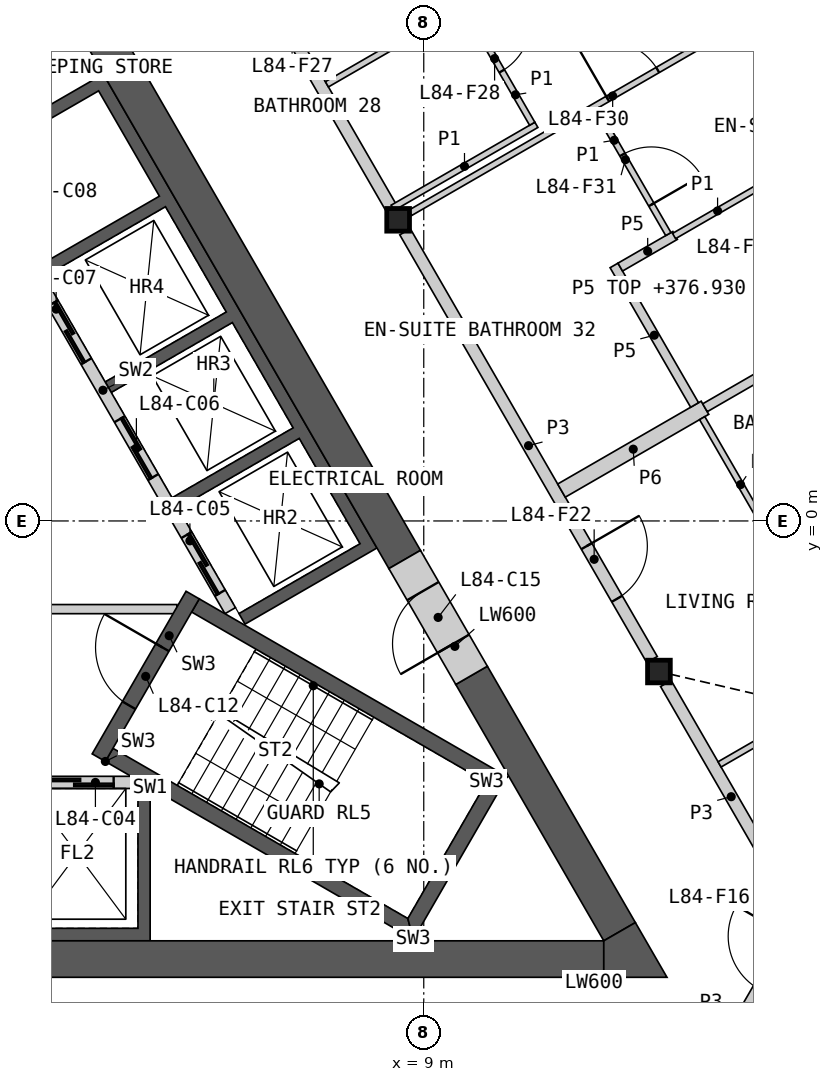
"""IFC4 building model, lengths in metres.
Left out: names, types, materials, properties, quantities, classifications, styles, units other than length and angle.
Written with IfcOpenShell. Run it as: python <this file> out.ifc"""

import sys

from ifc_helpers import new_model, si_unit, direction, frame, frame_2d, origin, origin_2d, place, context, subcontext, project, spatial, polyline, rectangle, i_section, outline, extrude, element, fill, save


model = new_model("IFC4")
c1 = context("Model", 3, precision=1e-05, world=origin(), true_north=direction((0.0, 1.0)))
c2 = subcontext(c1, "Body", "Model", "MODEL_VIEW")
j1 = project(units=[si_unit("LENGTHUNIT", "METRE"), si_unit("PLANEANGLEUNIT", "RADIAN")], contexts=[c1])
p1 = place(None, origin())
s1 = spatial("IfcSite", under=j1, at=p1, CompositionType="ELEMENT")
p2 = place(p1, origin())
s2 = spatial("IfcBuilding", under=s1, at=p2, CompositionType="ELEMENT")
p3 = place(p2, frame((0.0, 0.0, 374.6)))
s3 = spatial("IfcBuildingStorey", under=s2, at=p3, CompositionType="ELEMENT", Elevation=374.6)
for number, where, z_axis, x_axis in (
    (1, (12.868, -2.476, 0.0), (0.0, 0.0, 1.0), (1.0, 0.0, 0.0)),
    (2, (8.578, 4.953, 0.0), (0.0, 0.0, 1.0), (1.0, 0.0, 0.0)),
):
    element("IfcColumn", number, at=place(p3, frame(where, z_axis=z_axis, x_axis=x_axis)), inside=s3, PredefinedType="COLUMN", context=c2, shape_type="SweptSolid", body=[
        extrude(i_section(OverallWidth=0.374, OverallDepth=0.372, WebThickness=0.016, FlangeThickness=0.026, at=origin_2d()), origin(), (0.0, 0.0, 1.0), 3.4),
    ])
p4 = place(p3, origin())
e3 = element("IfcWall", 3, at=p4, inside=s3, PredefinedType="SHEAR", context=c2, shape_type="SweptSolid", body=[
    extrude(outline(polyline([(4.5, -4.4), (4.5, -6.906), (-4.5, -6.906), (-4.5, -4.4), (-4.3, -4.4), (-4.3, -6.7), (-2.3, -6.7), (-2.3, -4.4), (-2.1, -4.4), (-2.1, -6.7), (-0.1, -6.7), (-0.1, -4.4), (0.1, -4.4), (0.1, -6.7), (2.1, -6.7), (2.1, -4.4), (2.3, -4.4), (2.3, -6.7), (4.3, -6.7), (4.3, -4.4), (4.5, -4.4)])), origin(), (0.0, 0.0, 1.0), 3.1),
])
p5 = place(p3, frame((-4.187, -4.3, 0.0), z_axis=(0.0, 0.0, 1.0), x_axis=(1.0, 0.0, 0.0)))
e4 = element("IfcWall", 4, at=p5, inside=s3, PredefinedType="SOLIDWALL", context=c2, shape_type="SweptSolid", body=[
    extrude(rectangle(XDim=8.373, YDim=0.2, at=frame_2d((4.187, 0.0))), origin(), (0.0, 0.0, 1.0), 3.1),
])
p6 = place(p5, frame((0.287, 0.0, 0.0)))
e5 = element("IfcOpeningElement", 5, at=p6, cuts=e4, PredefinedType="OPENING", context=c2, shape_type="SweptSolid", body=[
    extrude(rectangle(XDim=1.2, YDim=2.1, at=frame_2d((0.6, 1.05))), frame((0.0, 0.11, 0.0), z_axis=(0.0, -1.0, 0.0), x_axis=(1.0, 0.0, 0.0)), (0.0, 0.0, 1.0), 0.22),
])
p7 = place(p5, frame((2.387, 0.0, 0.0)))
e6 = element("IfcOpeningElement", 6, at=p7, cuts=e4, PredefinedType="OPENING", context=c2, shape_type="SweptSolid", body=[
    extrude(rectangle(XDim=1.4, YDim=2.1, at=frame_2d((0.7, 1.05))), frame((0.0, 0.11, 0.0), z_axis=(0.0, -1.0, 0.0), x_axis=(1.0, 0.0, 0.0)), (0.0, 0.0, 1.0), 0.22),
])
p8 = place(p5, frame((4.737, 0.0, 0.0)))
e7 = element("IfcOpeningElement", 7, at=p8, cuts=e4, PredefinedType="OPENING", context=c2, shape_type="SweptSolid", body=[
    extrude(rectangle(XDim=1.1, YDim=2.1, at=frame_2d((0.55, 1.05))), frame((0.0, 0.11, 0.0), z_axis=(0.0, -1.0, 0.0), x_axis=(1.0, 0.0, 0.0)), (0.0, 0.0, 1.0), 0.22),
])
p9 = place(p5, frame((6.887, 0.0, 0.0)))
e8 = element("IfcOpeningElement", 8, at=p9, cuts=e4, PredefinedType="OPENING", context=c2, shape_type="SweptSolid", body=[
    extrude(rectangle(XDim=1.2, YDim=2.1, at=frame_2d((0.6, 1.05))), frame((0.0, 0.11, 0.0), z_axis=(0.0, -1.0, 0.0), x_axis=(1.0, 0.0, 0.0)), (0.0, 0.0, 1.0), 0.22),
])
p10 = place(p3, origin())
e9 = element("IfcWall", 9, at=p10, inside=s3, PredefinedType="SHEAR", context=c2, shape_type="SweptSolid", body=[
    extrude(outline(polyline([(1.561, 6.097), (3.731, 7.35), (8.231, -0.444), (6.061, -1.697), (5.96, -1.524), (7.952, -0.374), (6.952, 1.358), (4.96, 0.208), (4.861, 0.381), (6.852, 1.531), (5.852, 3.263), (3.861, 2.113), (3.76, 2.287), (5.752, 3.437), (4.752, 5.169), (2.76, 4.019), (2.66, 4.192), (4.652, 5.342), (3.652, 7.074), (1.66, 5.924), (1.561, 6.097)])), origin(), (0.0, 0.0, 1.0), 3.1),
])
p11 = place(p3, frame((5.817, -1.476, 0.0), z_axis=(0.0, 0.0, 1.0), x_axis=(-0.500002616675, 0.866023893041, 0.0)))
e10 = element("IfcWall", 10, at=p11, inside=s3, PredefinedType="SOLIDWALL", context=c2, shape_type="SweptSolid", body=[
    extrude(rectangle(XDim=8.373, YDim=0.2, at=frame_2d((4.187, 0.0))), origin(), (0.0, 0.0, 1.0), 3.1),
])
p12 = place(p11, frame((0.337, 0.0, 0.0)))
e11 = element("IfcOpeningElement", 11, at=p12, cuts=e10, PredefinedType="OPENING", context=c2, shape_type="SweptSolid", body=[
    extrude(rectangle(XDim=1.1, YDim=2.1, at=frame_2d((0.55, 1.05))), frame((0.0, 0.11, 0.0), z_axis=(0.0, -1.0, 0.0), x_axis=(1.0, 0.0, 0.0)), (0.0, 0.0, 1.0), 0.22),
])
p13 = place(p11, frame((2.537, 0.0, 0.0)))
e12 = element("IfcOpeningElement", 12, at=p13, cuts=e10, PredefinedType="OPENING", context=c2, shape_type="SweptSolid", body=[
    extrude(rectangle(XDim=1.1, YDim=2.1, at=frame_2d((0.55, 1.05))), frame((0.0, 0.11, 0.0), z_axis=(0.0, -1.0, 0.0), x_axis=(1.0, 0.0, 0.0)), (0.0, 0.0, 1.0), 0.22),
])
p14 = place(p11, frame((4.737, 0.0, 0.0)))
e13 = element("IfcOpeningElement", 13, at=p14, cuts=e10, PredefinedType="OPENING", context=c2, shape_type="SweptSolid", body=[
    extrude(rectangle(XDim=1.1, YDim=2.1, at=frame_2d((0.55, 1.05))), frame((0.0, 0.11, 0.0), z_axis=(0.0, -1.0, 0.0), x_axis=(1.0, 0.0, 0.0)), (0.0, 0.0, 1.0), 0.22),
])
p15 = place(p11, frame((7.037, 0.0, 0.0)))
e14 = element("IfcOpeningElement", 14, at=p15, cuts=e10, PredefinedType="OPENING", context=c2, shape_type="SweptSolid", body=[
    extrude(rectangle(XDim=0.9, YDim=2.1, at=frame_2d((0.45, 1.05))), frame((0.0, 0.11, 0.0), z_axis=(0.0, -1.0, 0.0), x_axis=(1.0, 0.0, 0.0)), (0.0, 0.0, 1.0), 0.22),
])
p16 = place(p3, frame((-4.941, -1.45, 0.0), z_axis=(0.0, 0.0, 1.0), x_axis=(1.0, 0.0, 0.0)))
e15 = element("IfcWall", 15, at=p16, inside=s3, PredefinedType="PARTITIONING", context=c2, shape_type="SweptSolid", body=[
    extrude(rectangle(XDim=9.882, YDim=0.15, at=frame_2d((4.941, 0.0))), origin(), (0.0, 0.0, 1.0), 3.1),
])
p17 = place(p16, frame((4.391, 0.0, 0.0)))
e16 = element("IfcOpeningElement", 16, at=p17, cuts=e15, PredefinedType="OPENING", context=c2, shape_type="SweptSolid", body=[
    extrude(rectangle(XDim=1.1, YDim=2.1, at=frame_2d((0.55, 1.05))), frame((0.0, 0.085, 0.0), z_axis=(0.0, -1.0, 0.0), x_axis=(1.0, 0.0, 0.0)), (0.0, 0.0, 1.0), 0.17),
])
p18 = place(p3, origin())
e17 = element("IfcWall", 17, at=p18, inside=s3, PredefinedType="SHEAR", context=c2, shape_type="SweptSolid", body=[
    extrude(outline(polyline([(3.763, -3.956), (8.83, -6.881), (8.738, -6.539), (3.888, -3.739), (3.763, -3.956)])), origin(), (0.0, 0.0, 1.0), 3.1),
])
p19 = place(p3, origin())
e18 = element("IfcWall", 18, at=p19, inside=s3, PredefinedType="SHEAR", context=c2, shape_type="SweptSolid", body=[
    extrude(outline(polyline([(8.83, -6.881), (10.374, -4.206), (10.032, -4.298), (8.738, -6.539), (8.83, -6.881)])), origin(), (0.0, 0.0, 1.0), 3.1),
])
p20 = place(p3, origin())
e19 = element("IfcWall", 19, at=p20, inside=s3, PredefinedType="SHEAR", context=c2, shape_type="SweptSolid", body=[
    extrude(outline(polyline([(10.032, -4.298), (10.374, -4.206), (5.307, -1.281), (5.182, -1.498), (10.032, -4.298)])), origin(), (0.0, 0.0, 1.0), 3.1),
])
p21 = place(p3, frame((3.655, -3.893, 0.0), z_axis=(0.0, 0.0, 1.0), x_axis=(0.499982516597, 0.866035497597, 0.0)))
e20 = element("IfcWall", 20, at=p21, inside=s3, PredefinedType="SHEAR", context=c2, shape_type="SweptSolid", body=[
    extrude(rectangle(XDim=3.088, YDim=0.25, at=frame_2d((1.544, 0.0))), origin(), (0.0, 0.0, 1.0), 3.1),
])
p22 = place(p21, frame((0.994, 0.0, 0.0)))
e21 = element("IfcOpeningElement", 21, at=p22, cuts=e20, PredefinedType="OPENING", context=c2, shape_type="SweptSolid", body=[
    extrude(rectangle(XDim=1.1, YDim=2.1, at=frame_2d((0.55, 1.05))), frame((0.0, 0.135, 0.0), z_axis=(0.0, -1.0, 0.0), x_axis=(1.0, 0.0, 0.0)), (0.0, 0.0, 1.0), 0.27),
])
for number, where, z_axis, x_axis in (
    (22, (-4.892, -7.206, 0.0), (0.0, 0.0, 1.0), (1.0, 0.0, 0.0)),
    (23, (8.686, -0.634, 0.0), (0.0, 0.0, 1.0), (-0.5, 0.866, 0.0)),
):
    element("IfcWall", number, at=place(p3, frame(where, z_axis=z_axis, x_axis=x_axis)), inside=s3, PredefinedType="SHEAR", context=c2, shape_type="SweptSolid", body=[
        extrude(rectangle(XDim=16.853, YDim=0.6, at=frame_2d((8.426, 0.0))), origin(), (0.0, 0.0, 1.0), 3.1),
    ])
p23 = place(p3, frame((12.221, -6.756, 0.0), z_axis=(0.0, 0.0, 1.0), x_axis=(-0.50000604952, 0.866021911064, 0.0)))
e24 = element("IfcWall", 24, at=p23, inside=s3, PredefinedType="SHEAR", context=c2, shape_type="SweptSolid", body=[
    extrude(rectangle(XDim=4.869, YDim=0.6, at=frame_2d((2.434, 0.0))), origin(), (0.0, 0.0, 1.0), 3.1),
])
p24 = place(p3, origin())
e25 = element("IfcWall", 25, at=p24, inside=s3, PredefinedType="SHEAR", context=c2, shape_type="SweptSolid", body=[
    extrude(outline(polyline([(11.961, -7.506), (11.961, -6.906), (12.48, -6.606), (13.0, -7.506), (11.961, -7.506)])), origin(), (0.0, 0.0, 1.0), 3.1),
])
p25 = place(p3, frame((9.786, -2.539, 0.0), z_axis=(0.0, 0.0, 1.0), x_axis=(-0.499981787252, 0.866035918664, 0.0)))
e26 = element("IfcWall", 26, at=p25, inside=s3, PredefinedType="SHEAR", context=c2, shape_type="SweptSolid", body=[
    extrude(rectangle(XDim=2.2, YDim=0.6, at=frame_2d((1.1, 0.0))), origin(), (0.0, 0.0, 1.0), 3.1),
])
p26 = place(p25, frame((0.6, 0.0, 0.0)))
e27 = element("IfcOpeningElement", 27, at=p26, cuts=e26, PredefinedType="OPENING", context=c2, shape_type="SweptSolid", body=[
    extrude(rectangle(XDim=1.0, YDim=2.1, at=frame_2d((0.5, 1.05))), frame((0.0, 0.31, 0.0), z_axis=(0.0, -1.0, 0.0), x_axis=(1.0, 0.0, 0.0)), (0.0, 0.0, 1.0), 0.62),
])
p27 = place(p3, frame((4.403, 12.185, 0.0), z_axis=(0.0, 0.0, 1.0), x_axis=(0.499992155518, -0.866029932751, 0.0)))
e28 = element("IfcWall", 28, at=p27, inside=s3, PredefinedType="PARTITIONING", context=c2, shape_type="SweptSolid", body=[
    extrude(rectangle(XDim=8.123, YDim=0.2, at=frame_2d((4.062, 0.0))), origin(), (0.0, 0.0, 1.0), 3.1),
])
p28 = place(p27, frame((3.963, 0.0, 0.0)))
e29 = element("IfcOpeningElement", 29, at=p28, cuts=e28, PredefinedType="OPENING", context=c2, shape_type="SweptSolid", body=[
    extrude(rectangle(XDim=1.0, YDim=2.1, at=frame_2d((0.5, 1.05))), frame((0.0, 0.11, 0.0), z_axis=(0.0, -1.0, 0.0), x_axis=(1.0, 0.0, 0.0)), (0.0, 0.0, 1.0), 0.22),
])
p29 = place(p3, frame((8.692, 4.756, 0.0), z_axis=(0.0, 0.0, 1.0), x_axis=(0.500001682468, -0.866024432409, 0.0)))
e30 = element("IfcWall", 30, at=p29, inside=s3, PredefinedType="PARTITIONING", context=c2, shape_type="SweptSolid", body=[
    extrude(rectangle(XDim=8.124, YDim=0.2, at=frame_2d((4.062, 0.0))), origin(), (0.0, 0.0, 1.0), 3.1),
])
p30 = place(p29, frame((5.97, 0.0, 0.0)))
e31 = element("IfcOpeningElement", 31, at=p30, cuts=e30, PredefinedType="OPENING", context=c2, shape_type="SweptSolid", body=[
    extrude(rectangle(XDim=1.0, YDim=2.1, at=frame_2d((0.5, 1.05))), frame((0.0, 0.11, 0.0), z_axis=(0.0, -1.0, 0.0), x_axis=(1.0, 0.0, 0.0)), (0.0, 0.0, 1.0), 0.22),
])
p31 = place(p3, frame((12.981, -2.673, 0.0), z_axis=(0.0, 0.0, 1.0), x_axis=(0.499986217557, -0.866033360935, 0.0)))
e32 = element("IfcWall", 32, at=p31, inside=s3, PredefinedType="PARTITIONING", context=c2, shape_type="SweptSolid", body=[
    extrude(rectangle(XDim=4.3, YDim=0.2, at=frame_2d((2.15, 0.0))), origin(), (0.0, 0.0, 1.0), 3.1),
])
p32 = place(p3, frame((13.293, -9.797, 0.0), z_axis=(0.0, 0.0, 1.0), x_axis=(0.499967746641, 0.866044024469, 0.0)))
e33 = element("IfcWall", 33, at=p32, inside=s3, PredefinedType="PARTITIONING", context=c2, shape_type="SweptSolid", body=[
    extrude(rectangle(XDim=3.676, YDim=0.2, at=frame_2d((1.838, 0.0))), origin(), (0.0, 0.0, 1.0), 3.1),
])
p33 = place(p32, frame((2.426, 0.0, 0.0)))
e34 = element("IfcOpeningElement", 34, at=p33, cuts=e33, PredefinedType="OPENING", context=c2, shape_type="SweptSolid", body=[
    extrude(rectangle(XDim=1.0, YDim=2.1, at=frame_2d((0.5, 1.05))), frame((0.0, 0.11, 0.0), z_axis=(0.0, -1.0, 0.0), x_axis=(1.0, 0.0, 0.0)), (0.0, 0.0, 1.0), 0.22),
])
p34 = place(p3, frame((11.265, 0.5, 0.0), z_axis=(0.0, 0.0, 1.0), x_axis=(0.866051307416, 0.49995513091, 0.0)))
e35 = element("IfcWall", 35, at=p34, inside=s3, PredefinedType="PARTITIONING", context=c2, shape_type="SweptSolid", body=[
    extrude(rectangle(XDim=2.725, YDim=0.25, at=frame_2d((1.362, 0.0))), origin(), (0.0, 0.0, 1.0), 2.33),
])
p35 = place(p3, frame((13.625, 1.862, 0.0), z_axis=(0.0, 0.0, 1.0), x_axis=(0.866013657776, 0.500020344131, 0.0)))
e36 = element("IfcWall", 36, at=p35, inside=s3, PredefinedType="PLUMBINGWALL", context=c2, shape_type="SweptSolid", body=[
    extrude(rectangle(XDim=2.625, YDim=0.15, at=frame_2d((1.312, 0.0))), origin(), (0.0, 0.0, 1.0), 2.33),
])
p36 = place(p3, frame((12.129, 4.203, 0.0), z_axis=(0.0, 0.0, 1.0), x_axis=(0.499993606316, -0.866029095148, 0.0)))
e37 = element("IfcWall", 37, at=p36, inside=s3, PredefinedType="PLUMBINGWALL", context=c2, shape_type="SweptSolid", body=[
    extrude(rectangle(XDim=2.65, YDim=0.15, at=frame_2d((1.325, 0.0))), origin(), (0.0, 0.0, 1.0), 2.33),
])
p37 = place(p3, frame((12.232, 4.175, 0.0), z_axis=(0.0, 0.0, 1.0), x_axis=(0.866056787991, 0.499945637019, 0.0)))
e38 = element("IfcWall", 38, at=p37, inside=s3, PredefinedType="PLUMBINGWALL", context=c2, shape_type="SweptSolid", body=[
    extrude(rectangle(XDim=1.042, YDim=0.15, at=frame_2d((0.521, 0.0))), origin(), (0.0, 0.0, 1.0), 2.33),
])
p38 = place(p3, frame((13.865, -4.004, 0.0), z_axis=(0.0, 0.0, 1.0), x_axis=(0.866023404247, 0.500003463284, 0.0)))
e39 = element("IfcWall", 39, at=p38, inside=s3, PredefinedType="PARTITIONING", context=c2, shape_type="SweptSolid", body=[
    extrude(rectangle(XDim=11.782, YDim=0.1, at=frame_2d((5.891, 0.0))), origin(), (0.0, 0.0, 1.0), 2.33),
])
p39 = place(p38, frame((7.874, 0.0, 0.0)))
e40 = element("IfcOpeningElement", 40, at=p39, cuts=e39, PredefinedType="OPENING", context=c2, shape_type="SweptSolid", body=[
    extrude(rectangle(XDim=0.95, YDim=2.1, at=frame_2d((0.475, 1.05))), frame((0.0, 0.06, 0.0), z_axis=(0.0, -1.0, 0.0), x_axis=(1.0, 0.0, 0.0)), (0.0, 0.0, 1.0), 0.12),
])
p40 = place(p3, frame((8.775, 5.066, 0.0), z_axis=(0.0, 0.0, 1.0), x_axis=(0.866023724155, 0.500002909193, 0.0)))
e41 = element("IfcWall", 41, at=p40, inside=s3, PredefinedType="PARTITIONING", context=c2, shape_type="SweptSolid", body=[
    extrude(rectangle(XDim=11.655, YDim=0.1, at=frame_2d((5.827, 0.0))), origin(), (0.0, 0.0, 1.0), 2.33),
])
p41 = place(p40, frame((3.751, 0.0, 0.0)))
e42 = element("IfcOpeningElement", 42, at=p41, cuts=e41, PredefinedType="OPENING", context=c2, shape_type="SweptSolid", body=[
    extrude(rectangle(XDim=0.95, YDim=2.1, at=frame_2d((0.475, 1.05))), frame((0.0, 0.06, 0.0), z_axis=(0.0, -1.0, 0.0), x_axis=(1.0, 0.0, 0.0)), (0.0, 0.0, 1.0), 0.12),
])
p42 = place(p3, frame((13.579, 1.691, 0.0), z_axis=(0.0, 0.0, 1.0), x_axis=(0.500048846702, -0.865997200291, 0.0)))
e43 = element("IfcWall", 43, at=p42, inside=s3, PredefinedType="PARTITIONING", context=c2, shape_type="SweptSolid", body=[
    extrude(rectangle(XDim=2.525, YDim=0.1, at=frame_2d((1.263, 0.0))), origin(), (0.0, 0.0, 1.0), 2.33),
])
p43 = place(p3, frame((7.407, 7.182, 0.0), z_axis=(0.0, 0.0, 1.0), x_axis=(0.866052124492, 0.499953715521, 0.0)))
e44 = element("IfcWall", 44, at=p43, inside=s3, PredefinedType="PARTITIONING", context=c2, shape_type="SweptSolid", body=[
    extrude(rectangle(XDim=2.65, YDim=0.1, at=frame_2d((1.325, 0.0))), origin(), (0.0, 0.0, 1.0), 2.33),
])
p44 = place(p3, frame((8.488, 5.15, 0.0), z_axis=(0.0, 0.0, 1.0), x_axis=(0.866027727466, 0.499995975244, 0.0)))
e45 = element("IfcWall", 45, at=p44, inside=s3, PredefinedType="PARTITIONING", context=c2, shape_type="SweptSolid", body=[
    extrude(rectangle(XDim=2.73, YDim=0.1, at=frame_2d((1.365, 0.0))), origin(), (0.0, 0.0, 1.0), 2.33),
])
p45 = place(p3, frame((11.835, 6.775, 0.0), z_axis=(0.0, 0.0, 1.0), x_axis=(0.500030943131, -0.866007538022, 0.0)))
e46 = element("IfcWall", 46, at=p45, inside=s3, PredefinedType="PARTITIONING", context=c2, shape_type="SweptSolid", body=[
    extrude(rectangle(XDim=2.375, YDim=0.1, at=frame_2d((1.188, 0.0))), origin(), (0.0, 0.0, 1.0), 2.33),
])
p46 = place(p45, frame((0.867, 0.0, 0.0)))
e47 = element("IfcOpeningElement", 47, at=p46, cuts=e46, PredefinedType="OPENING", context=c2, shape_type="SweptSolid", body=[
    extrude(rectangle(XDim=0.95, YDim=2.1, at=frame_2d((0.475, 1.05))), frame((0.0, 0.06, 0.0), z_axis=(0.0, -1.0, 0.0), x_axis=(1.0, 0.0, 0.0)), (0.0, 0.0, 1.0), 0.12),
])
p47 = place(p3, frame((9.684, 8.438, 0.0), z_axis=(0.0, 0.0, 1.0), x_axis=(0.499994660107, -0.866028486751, 0.0)))
e48 = element("IfcWall", 48, at=p47, inside=s3, PredefinedType="PARTITIONING", context=c2, shape_type="SweptSolid", body=[
    extrude(rectangle(XDim=2.2, YDim=0.1, at=frame_2d((1.1, 0.0))), origin(), (0.0, 0.0, 1.0), 2.33),
])
p48 = place(p47, frame((0.25, 0.0, 0.0)))
e49 = element("IfcOpeningElement", 49, at=p48, cuts=e48, PredefinedType="OPENING", context=c2, shape_type="SweptSolid", body=[
    extrude(rectangle(XDim=0.95, YDim=2.1, at=frame_2d((0.475, 1.05))), frame((0.0, 0.06, 0.0), z_axis=(0.0, -1.0, 0.0), x_axis=(1.0, 0.0, 0.0)), (0.0, 0.0, 1.0), 0.12),
])
p49 = place(p3, frame((13.116, 4.686, 0.0), z_axis=(0.0, 0.0, 1.0), x_axis=(0.866072496716, 0.499918423778, 0.0)))
e50 = element("IfcWall", 50, at=p49, inside=s3, PredefinedType="PARTITIONING", context=c2, shape_type="SweptSolid", body=[
    extrude(rectangle(XDim=1.654, YDim=0.1, at=frame_2d((0.827, 0.0))), origin(), (0.0, 0.0, 1.0), 2.33),
])
p50 = place(p9, origin())
e51 = element("IfcDoor", 51, at=p50, inside=s3, OperationType="SLIDING_TO_LEFT", PredefinedType="DOOR", context=c2, shape_type="SweptSolid", body=[
    extrude(rectangle(XDim=1.2, YDim=2.1, at=frame_2d((0.6, 1.05))), frame((0.0, 0.025, 0.0), z_axis=(0.0, -1.0, 0.0), x_axis=(1.0, 0.0, 0.0)), (0.0, 0.0, 1.0), 0.05),
])
fill(e8, e51)
p51 = place(p12, origin())
e52 = element("IfcDoor", 52, at=p51, inside=s3, OperationType="SLIDING_TO_LEFT", PredefinedType="DOOR", context=c2, shape_type="SweptSolid", body=[
    extrude(rectangle(XDim=1.1, YDim=2.1, at=frame_2d((0.55, 1.05))), frame((0.0, 0.025, 0.0), z_axis=(0.0, -1.0, 0.0), x_axis=(1.0, 0.0, 0.0)), (0.0, 0.0, 1.0), 0.05),
])
fill(e11, e52)
p52 = place(p13, origin())
e53 = element("IfcDoor", 53, at=p52, inside=s3, OperationType="SLIDING_TO_LEFT", PredefinedType="DOOR", context=c2, shape_type="SweptSolid", body=[
    extrude(rectangle(XDim=1.1, YDim=2.1, at=frame_2d((0.55, 1.05))), frame((0.0, 0.025, 0.0), z_axis=(0.0, -1.0, 0.0), x_axis=(1.0, 0.0, 0.0)), (0.0, 0.0, 1.0), 0.05),
])
fill(e12, e53)
p53 = place(p14, origin())
e54 = element("IfcDoor", 54, at=p53, inside=s3, OperationType="SLIDING_TO_LEFT", PredefinedType="DOOR", context=c2, shape_type="SweptSolid", body=[
    extrude(rectangle(XDim=1.1, YDim=2.1, at=frame_2d((0.55, 1.05))), frame((0.0, 0.025, 0.0), z_axis=(0.0, -1.0, 0.0), x_axis=(1.0, 0.0, 0.0)), (0.0, 0.0, 1.0), 0.05),
])
fill(e13, e54)
p54 = place(p22, origin())
e55 = element("IfcDoor", 55, at=p54, inside=s3, OperationType="SINGLE_SWING_RIGHT", PredefinedType="DOOR", context=c2, shape_type="SweptSolid", body=[
    extrude(rectangle(XDim=1.1, YDim=2.1, at=frame_2d((0.55, 1.05))), frame((0.0, 0.025, 0.0), z_axis=(0.0, -1.0, 0.0), x_axis=(1.0, 0.0, 0.0)), (0.0, 0.0, 1.0), 0.05),
])
fill(e21, e55)
p55 = place(p26, origin())
e56 = element("IfcDoor", 56, at=p55, inside=s3, OperationType="SINGLE_SWING_LEFT", PredefinedType="DOOR", context=c2, shape_type="SweptSolid", body=[
    extrude(rectangle(XDim=1.0, YDim=2.1, at=frame_2d((0.5, 1.05))), frame((0.0, 0.055, 0.0), z_axis=(0.0, -1.0, 0.0), x_axis=(1.0, 0.0, 0.0)), (0.0, 0.0, 1.0), 0.05),
])
fill(e27, e56)
p56 = place(p30, origin())
e57 = element("IfcDoor", 57, at=p56, inside=s3, OperationType="SINGLE_SWING_LEFT", PredefinedType="DOOR", context=c2, shape_type="SweptSolid", body=[
    extrude(rectangle(XDim=1.0, YDim=2.1, at=frame_2d((0.5, 1.05))), frame((0.0, 0.025, 0.0), z_axis=(0.0, -1.0, 0.0), x_axis=(1.0, 0.0, 0.0)), (0.0, 0.0, 1.0), 0.05),
])
fill(e31, e57)
p57 = place(p48, origin())
e58 = element("IfcDoor", 58, at=p57, inside=s3, OperationType="SINGLE_SWING_LEFT", PredefinedType="DOOR", context=c2, shape_type="SweptSolid", body=[
    extrude(rectangle(XDim=0.95, YDim=2.1, at=frame_2d((0.475, 1.05))), frame((0.0, 0.025, 0.0), z_axis=(0.0, -1.0, 0.0), x_axis=(1.0, 0.0, 0.0)), (0.0, 0.0, 1.0), 0.05),
])
fill(e49, e58)
p58 = place(p41, origin())
e59 = element("IfcDoor", 59, at=p58, inside=s3, OperationType="SINGLE_SWING_LEFT", PredefinedType="DOOR", context=c2, shape_type="SweptSolid", body=[
    extrude(rectangle(XDim=0.95, YDim=2.1, at=frame_2d((0.475, 1.05))), frame((0.0, 0.025, 0.0), z_axis=(0.0, -1.0, 0.0), x_axis=(1.0, 0.0, 0.0)), (0.0, 0.0, 1.0), 0.05),
])
fill(e42, e59)
p59 = place(p46, origin())
e60 = element("IfcDoor", 60, at=p59, inside=s3, OperationType="SINGLE_SWING_RIGHT", PredefinedType="DOOR", context=c2, shape_type="SweptSolid", body=[
    extrude(rectangle(XDim=0.95, YDim=2.1, at=frame_2d((0.475, 1.05))), frame((0.0, 0.025, 0.0), z_axis=(0.0, -1.0, 0.0), x_axis=(1.0, 0.0, 0.0)), (0.0, 0.0, 1.0), 0.05),
])
fill(e47, e60)
save(model, sys.argv[1])
